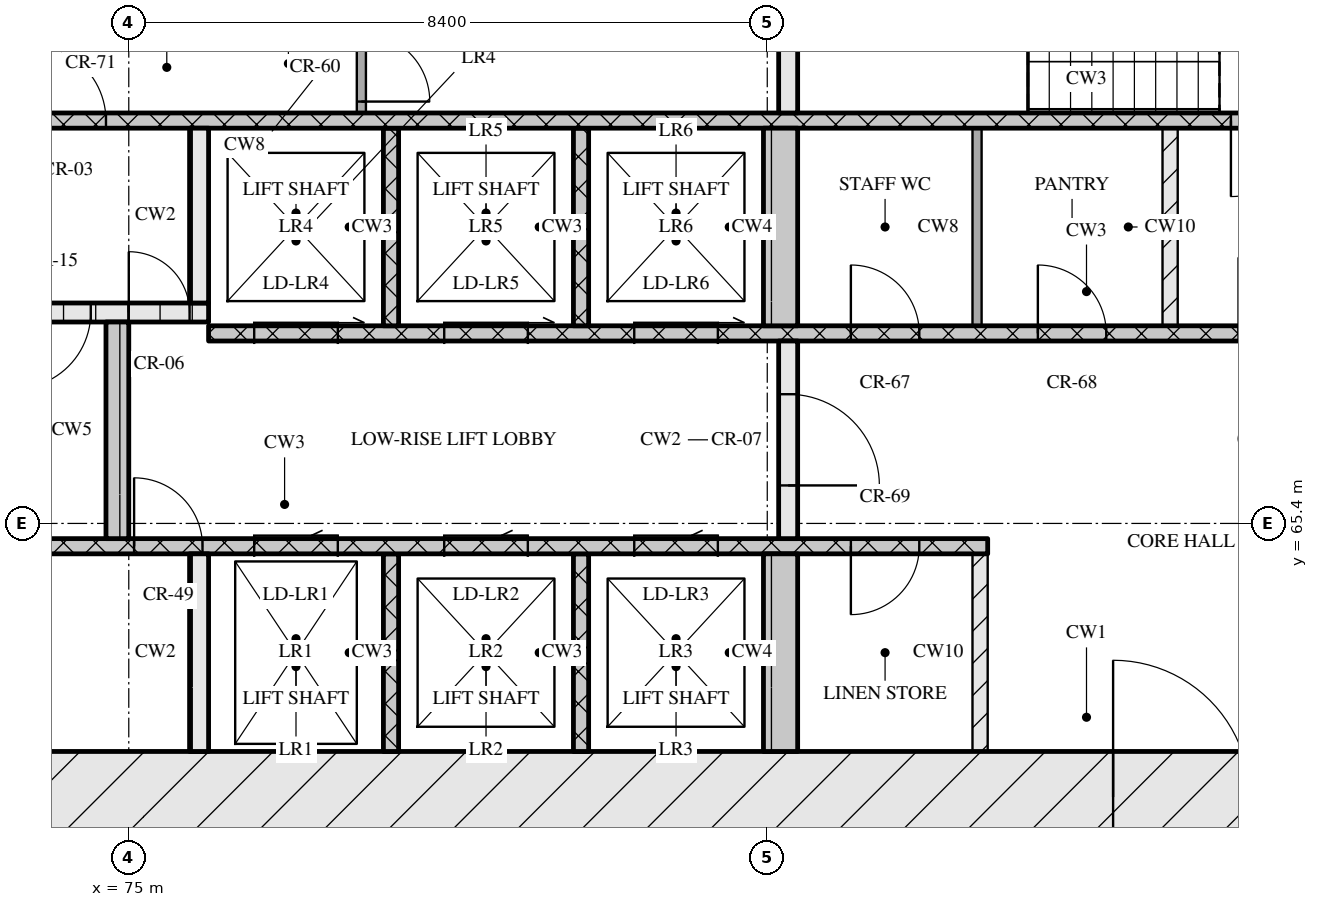
"""IFC4 building model, lengths in metres.
Left out: names, types, materials, properties, quantities, classifications, styles, units other than length and angle.
Written with IfcOpenShell. Run it as: python <this file> out.ifc"""

import sys

from ifc_helpers import new_model, si_unit, direction, frame, frame_2d, origin, place, context, subcontext, project, spatial, rectangle, extrude, element, fill, save


model = new_model("IFC4")
c1 = context("Model", 3, precision=1e-05, world=origin(), true_north=direction((0.0, 1.0)))
c2 = subcontext(c1, "Body", "Model", "MODEL_VIEW")
j1 = project(units=[si_unit("LENGTHUNIT", "METRE"), si_unit("PLANEANGLEUNIT", "RADIAN")], contexts=[c1])
p1 = place(None, origin())
s1 = spatial("IfcSite", under=j1, at=p1, CompositionType="ELEMENT")
p2 = place(p1, origin())
s2 = spatial("IfcBuilding", under=s1, at=p2, CompositionType="ELEMENT")
p3 = place(p2, frame((0.0, 0.0, 73.2)))
s3 = spatial("IfcBuildingStorey", under=s2, at=p3, CompositionType="ELEMENT", Elevation=73.2)
p4 = place(p3, frame((66.6, 61.8, 0.0), z_axis=(0.0, 0.0, 1.0), x_axis=(1.0, 0.0, 0.0)))
e1 = element("IfcWall", 1, at=p4, inside=s3, PredefinedType="SOLIDWALL", context=c2, shape_type="SweptSolid", body=[
    extrude(rectangle(XDim=42.0, YDim=1.2, at=frame_2d((21.0, 0.0))), origin(), (0.0, 0.0, 1.0), 3.32),
])
p5 = place(p4, frame((21.35, 0.0, 0.0)))
e2 = element("IfcOpeningElement", 2, at=p5, cuts=e1, PredefinedType="OPENING", context=c2, shape_type="SweptSolid", body=[
    extrude(rectangle(XDim=1.8, YDim=2.1, at=frame_2d((0.9, 1.05))), frame((0.0, 0.61, 0.0), z_axis=(0.0, -1.0, 0.0), x_axis=(1.0, 0.0, 0.0)), (0.0, 0.0, 1.0), 1.22),
])
p6 = place(p3, frame((75.925, 62.4, 0.0), z_axis=(0.0, 0.0, 1.0), x_axis=(0.0, 1.0, 0.0)))
e3 = element("IfcWall", 3, at=p6, inside=s3, PredefinedType="SOLIDWALL", context=c2, shape_type="SweptSolid", body=[
    extrude(rectangle(XDim=2.6, YDim=0.25, at=frame_2d((1.3, 0.0))), origin(), (0.0, 0.0, 1.0), 3.32),
])
for number, where, z_axis, x_axis in (
    (4, (78.45, 62.4, 0.0), (0.0, 0.0, 1.0), (0.0, 1.0, 0.0)),
    (5, (80.95, 62.4, 0.0), (0.0, 0.0, 1.0), (0.0, 1.0, 0.0)),
):
    element("IfcWall", number, at=place(p3, frame(where, z_axis=z_axis, x_axis=x_axis)), inside=s3, PredefinedType="SOLIDWALL", context=c2, shape_type="SweptSolid", body=[
        extrude(rectangle(XDim=2.6, YDim=0.2, at=frame_2d((1.3, 0.0))), origin(), (0.0, 0.0, 1.0), 3.32),
    ])
p7 = place(p3, frame((83.575, 62.4, 0.0), z_axis=(0.0, 0.0, 1.0), x_axis=(0.0, 1.0, 0.0)))
e6 = element("IfcWall", 6, at=p7, inside=s3, PredefinedType="SOLIDWALL", context=c2, shape_type="SweptSolid", body=[
    extrude(rectangle(XDim=2.6, YDim=0.45, at=frame_2d((1.3, 0.0))), origin(), (0.0, 0.0, 1.0), 3.32),
])
p8 = place(p3, frame((86.2, 62.4, 0.0), z_axis=(0.0, 0.0, 1.0), x_axis=(0.0, 1.0, 0.0)))
e7 = element("IfcWall", 7, at=p8, inside=s3, PredefinedType="PARTITIONING", context=c2, shape_type="SweptSolid", body=[
    extrude(rectangle(XDim=2.6, YDim=0.2, at=frame_2d((1.3, 0.0))), origin(), (0.0, 0.0, 1.0), 3.32),
])
p9 = place(p3, frame((67.8, 65.1, 0.0), z_axis=(0.0, 0.0, 1.0), x_axis=(1.0, 0.0, 0.0)))
e8 = element("IfcWall", 8, at=p9, inside=s3, PredefinedType="SOLIDWALL", context=c2, shape_type="SweptSolid", body=[
    extrude(rectangle(XDim=18.5, YDim=0.2, at=frame_2d((9.25, 0.0))), origin(), (0.0, 0.0, 1.0), 3.32),
])
p10 = place(p9, frame((7.27, 0.0, 0.0)))
e9 = element("IfcOpeningElement", 9, at=p10, cuts=e8, PredefinedType="OPENING", context=c2, shape_type="SweptSolid", body=[
    extrude(rectangle(XDim=0.9, YDim=2.1, at=frame_2d((0.45, 1.05))), frame((0.0, 0.11, 0.0), z_axis=(0.0, -1.0, 0.0), x_axis=(1.0, 0.0, 0.0)), (0.0, 0.0, 1.0), 0.22),
])
p11 = place(p9, frame((8.85, 0.0, 0.0)))
e10 = element("IfcOpeningElement", 10, at=p11, cuts=e8, PredefinedType="OPENING", context=c2, shape_type="SweptSolid", body=[
    extrude(rectangle(XDim=1.1, YDim=2.1, at=frame_2d((0.55, 1.05))), frame((0.0, 0.11, 0.0), z_axis=(0.0, -1.0, 0.0), x_axis=(1.0, 0.0, 0.0)), (0.0, 0.0, 1.0), 0.22),
])
p12 = place(p9, frame((11.35, 0.0, 0.0)))
e11 = element("IfcOpeningElement", 11, at=p12, cuts=e8, PredefinedType="OPENING", context=c2, shape_type="SweptSolid", body=[
    extrude(rectangle(XDim=1.1, YDim=2.1, at=frame_2d((0.55, 1.05))), frame((0.0, 0.11, 0.0), z_axis=(0.0, -1.0, 0.0), x_axis=(1.0, 0.0, 0.0)), (0.0, 0.0, 1.0), 0.22),
])
p13 = place(p9, frame((13.85, 0.0, 0.0)))
e12 = element("IfcOpeningElement", 12, at=p13, cuts=e8, PredefinedType="OPENING", context=c2, shape_type="SweptSolid", body=[
    extrude(rectangle(XDim=1.1, YDim=2.1, at=frame_2d((0.55, 1.05))), frame((0.0, 0.11, 0.0), z_axis=(0.0, -1.0, 0.0), x_axis=(1.0, 0.0, 0.0)), (0.0, 0.0, 1.0), 0.22),
])
p14 = place(p9, frame((16.7, 0.0, 0.0)))
e13 = element("IfcOpeningElement", 13, at=p14, cuts=e8, PredefinedType="OPENING", context=c2, shape_type="SweptSolid", body=[
    extrude(rectangle(XDim=0.9, YDim=2.1, at=frame_2d((0.45, 1.05))), frame((0.0, 0.11, 0.0), z_axis=(0.0, -1.0, 0.0), x_axis=(1.0, 0.0, 0.0)), (0.0, 0.0, 1.0), 0.22),
])
p15 = place(p3, frame((74.85, 65.2, 0.0), z_axis=(0.0, 0.0, 1.0), x_axis=(0.0, 1.0, 0.0)))
e14 = element("IfcWall", 14, at=p15, inside=s3, PredefinedType="SOLIDWALL", context=c2, shape_type="SweptSolid", body=[
    extrude(rectangle(XDim=2.85, YDim=0.3, at=frame_2d((1.425, 0.0))), origin(), (0.0, 0.0, 1.0), 3.32),
])
p16 = place(p3, frame((83.675, 65.2, 0.0), z_axis=(0.0, 0.0, 1.0), x_axis=(0.0, 1.0, 0.0)))
e15 = element("IfcWall", 15, at=p16, inside=s3, PredefinedType="SOLIDWALL", context=c2, shape_type="SweptSolid", body=[
    extrude(rectangle(XDim=2.6, YDim=0.25, at=frame_2d((1.3, 0.0))), origin(), (0.0, 0.0, 1.0), 3.32),
])
p17 = place(p16, frame((0.7, 0.0, 0.0)))
e16 = element("IfcOpeningElement", 16, at=p17, cuts=e15, PredefinedType="OPENING", context=c2, shape_type="SweptSolid", body=[
    extrude(rectangle(XDim=1.2, YDim=2.1, at=frame_2d((0.6, 1.05))), frame((0.0, 0.135, 0.0), z_axis=(0.0, -1.0, 0.0), x_axis=(1.0, 0.0, 0.0)), (0.0, 0.0, 1.0), 0.27),
])
p18 = place(p3, frame((76.05, 67.9, 0.0), z_axis=(0.0, 0.0, 1.0), x_axis=(1.0, 0.0, 0.0)))
e17 = element("IfcWall", 17, at=p18, inside=s3, PredefinedType="SOLIDWALL", context=c2, shape_type="SweptSolid", body=[
    extrude(rectangle(XDim=23.1, YDim=0.2, at=frame_2d((11.55, 0.0))), origin(), (0.0, 0.0, 1.0), 3.32),
])
p19 = place(p18, frame((0.6, 0.0, 0.0)))
e18 = element("IfcOpeningElement", 18, at=p19, cuts=e17, PredefinedType="OPENING", context=c2, shape_type="SweptSolid", body=[
    extrude(rectangle(XDim=1.1, YDim=2.1, at=frame_2d((0.55, 1.05))), frame((0.0, 0.11, 0.0), z_axis=(0.0, -1.0, 0.0), x_axis=(1.0, 0.0, 0.0)), (0.0, 0.0, 1.0), 0.22),
])
p20 = place(p18, frame((3.1, 0.0, 0.0)))
e19 = element("IfcOpeningElement", 19, at=p20, cuts=e17, PredefinedType="OPENING", context=c2, shape_type="SweptSolid", body=[
    extrude(rectangle(XDim=1.1, YDim=2.1, at=frame_2d((0.55, 1.05))), frame((0.0, 0.11, 0.0), z_axis=(0.0, -1.0, 0.0), x_axis=(1.0, 0.0, 0.0)), (0.0, 0.0, 1.0), 0.22),
])
p21 = place(p18, frame((5.6, 0.0, 0.0)))
e20 = element("IfcOpeningElement", 20, at=p21, cuts=e17, PredefinedType="OPENING", context=c2, shape_type="SweptSolid", body=[
    extrude(rectangle(XDim=1.1, YDim=2.1, at=frame_2d((0.55, 1.05))), frame((0.0, 0.11, 0.0), z_axis=(0.0, -1.0, 0.0), x_axis=(1.0, 0.0, 0.0)), (0.0, 0.0, 1.0), 0.22),
])
p22 = place(p18, frame((8.45, 0.0, 0.0)))
e21 = element("IfcOpeningElement", 21, at=p22, cuts=e17, PredefinedType="OPENING", context=c2, shape_type="SweptSolid", body=[
    extrude(rectangle(XDim=0.9, YDim=2.1, at=frame_2d((0.45, 1.05))), frame((0.0, 0.11, 0.0), z_axis=(0.0, -1.0, 0.0), x_axis=(1.0, 0.0, 0.0)), (0.0, 0.0, 1.0), 0.22),
])
p23 = place(p18, frame((10.91, 0.0, 0.0)))
e22 = element("IfcOpeningElement", 22, at=p23, cuts=e17, PredefinedType="OPENING", context=c2, shape_type="SweptSolid", body=[
    extrude(rectangle(XDim=0.9, YDim=2.1, at=frame_2d((0.45, 1.05))), frame((0.0, 0.11, 0.0), z_axis=(0.0, -1.0, 0.0), x_axis=(1.0, 0.0, 0.0)), (0.0, 0.0, 1.0), 0.22),
])
p24 = place(p18, frame((13.55, 0.0, 0.0)))
e23 = element("IfcOpeningElement", 23, at=p24, cuts=e17, PredefinedType="OPENING", context=c2, shape_type="SweptSolid", body=[
    extrude(rectangle(XDim=1.0, YDim=2.1, at=frame_2d((0.5, 1.05))), frame((0.0, 0.11, 0.0), z_axis=(0.0, -1.0, 0.0), x_axis=(1.0, 0.0, 0.0)), (0.0, 0.0, 1.0), 0.22),
])
for number, where, z_axis, x_axis in (
    (24, (78.45, 68.0, 0.0), (0.0, 0.0, 1.0), (0.0, 1.0, 0.0)),
    (25, (80.95, 68.0, 0.0), (0.0, 0.0, 1.0), (0.0, 1.0, 0.0)),
):
    element("IfcWall", number, at=place(p3, frame(where, z_axis=z_axis, x_axis=x_axis)), inside=s3, PredefinedType="SOLIDWALL", context=c2, shape_type="SweptSolid", body=[
        extrude(rectangle(XDim=2.6, YDim=0.2, at=frame_2d((1.3, 0.0))), origin(), (0.0, 0.0, 1.0), 3.32),
    ])
p25 = place(p3, frame((83.575, 68.0, 0.0), z_axis=(0.0, 0.0, 1.0), x_axis=(0.0, 1.0, 0.0)))
e26 = element("IfcWall", 26, at=p25, inside=s3, PredefinedType="SOLIDWALL", context=c2, shape_type="SweptSolid", body=[
    extrude(rectangle(XDim=2.6, YDim=0.45, at=frame_2d((1.3, 0.0))), origin(), (0.0, 0.0, 1.0), 3.32),
])
p26 = place(p3, frame((86.16, 68.0, 0.0), z_axis=(0.0, 0.0, 1.0), x_axis=(0.0, 1.0, 0.0)))
e27 = element("IfcWall", 27, at=p26, inside=s3, PredefinedType="PARTITIONING", context=c2, shape_type="SweptSolid", body=[
    extrude(rectangle(XDim=2.6, YDim=0.12, at=frame_2d((1.3, 0.0))), origin(), (0.0, 0.0, 1.0), 3.32),
])
p27 = place(p3, frame((88.7, 68.0, 0.0), z_axis=(0.0, 0.0, 1.0), x_axis=(0.0, 1.0, 0.0)))
e28 = element("IfcWall", 28, at=p27, inside=s3, PredefinedType="PARTITIONING", context=c2, shape_type="SweptSolid", body=[
    extrude(rectangle(XDim=2.6, YDim=0.2, at=frame_2d((1.3, 0.0))), origin(), (0.0, 0.0, 1.0), 3.32),
])
p28 = place(p3, frame((67.8, 68.175, 0.0), z_axis=(0.0, 0.0, 1.0), x_axis=(1.0, 0.0, 0.0)))
e29 = element("IfcWall", 29, at=p28, inside=s3, PredefinedType="SOLIDWALL", context=c2, shape_type="SweptSolid", body=[
    extrude(rectangle(XDim=8.25, YDim=0.25, at=frame_2d((4.125, 0.0))), origin(), (0.0, 0.0, 1.0), 3.32),
])
p29 = place(p28, frame((5.7, 0.0, 0.0)))
e30 = element("IfcOpeningElement", 30, at=p29, cuts=e29, PredefinedType="OPENING", context=c2, shape_type="SweptSolid", body=[
    extrude(rectangle(XDim=1.0, YDim=2.1, at=frame_2d((0.5, 1.05))), frame((0.0, 0.135, 0.0), z_axis=(0.0, -1.0, 0.0), x_axis=(1.0, 0.0, 0.0)), (0.0, 0.0, 1.0), 0.27),
])
p30 = place(p28, frame((7.2, 0.0, 0.0)))
e31 = element("IfcOpeningElement", 31, at=p30, cuts=e29, PredefinedType="OPENING", context=c2, shape_type="SweptSolid", body=[
    extrude(rectangle(XDim=0.8, YDim=2.1, at=frame_2d((0.4, 1.05))), frame((0.0, 0.135, 0.0), z_axis=(0.0, -1.0, 0.0), x_axis=(1.0, 0.0, 0.0)), (0.0, 0.0, 1.0), 0.27),
])
p31 = place(p3, frame((75.925, 68.3, 0.0), z_axis=(0.0, 0.0, 1.0), x_axis=(0.0, 1.0, 0.0)))
e32 = element("IfcWall", 32, at=p31, inside=s3, PredefinedType="SOLIDWALL", context=c2, shape_type="SweptSolid", body=[
    extrude(rectangle(XDim=2.3, YDim=0.25, at=frame_2d((1.15, 0.0))), origin(), (0.0, 0.0, 1.0), 3.32),
])
p32 = place(p3, frame((67.8, 70.7, 0.0), z_axis=(0.0, 0.0, 1.0), x_axis=(1.0, 0.0, 0.0)))
e33 = element("IfcWall", 33, at=p32, inside=s3, PredefinedType="SOLIDWALL", context=c2, shape_type="SweptSolid", body=[
    extrude(rectangle(XDim=39.6, YDim=0.2, at=frame_2d((19.8, 0.0))), origin(), (0.0, 0.0, 1.0), 3.32),
])
p33 = place(p32, frame((0.65, 0.0, 0.0)))
e34 = element("IfcOpeningElement", 34, at=p33, cuts=e33, PredefinedType="OPENING", context=c2, shape_type="SweptSolid", body=[
    extrude(rectangle(XDim=1.1, YDim=2.1, at=frame_2d((0.55, 1.05))), frame((0.0, 0.11, 0.0), z_axis=(0.0, -1.0, 0.0), x_axis=(1.0, 0.0, 0.0)), (0.0, 0.0, 1.0), 0.22),
])
p34 = place(p32, frame((3.25, 0.0, 0.0)))
e35 = element("IfcOpeningElement", 35, at=p34, cuts=e33, PredefinedType="OPENING", context=c2, shape_type="SweptSolid", body=[
    extrude(rectangle(XDim=1.1, YDim=2.1, at=frame_2d((0.55, 1.05))), frame((0.0, 0.11, 0.0), z_axis=(0.0, -1.0, 0.0), x_axis=(1.0, 0.0, 0.0)), (0.0, 0.0, 1.0), 0.22),
])
p35 = place(p32, frame((5.9, 0.0, 0.0)))
e36 = element("IfcOpeningElement", 36, at=p35, cuts=e33, PredefinedType="OPENING", context=c2, shape_type="SweptSolid", body=[
    extrude(rectangle(XDim=1.0, YDim=2.1, at=frame_2d((0.5, 1.05))), frame((0.0, 0.11, 0.0), z_axis=(0.0, -1.0, 0.0), x_axis=(1.0, 0.0, 0.0)), (0.0, 0.0, 1.0), 0.22),
])
p36 = place(p32, frame((21.7, 0.0, 0.0)))
e37 = element("IfcOpeningElement", 37, at=p36, cuts=e33, PredefinedType="OPENING", context=c2, shape_type="SweptSolid", body=[
    extrude(rectangle(XDim=1.0, YDim=2.1, at=frame_2d((0.5, 1.05))), frame((0.0, 0.11, 0.0), z_axis=(0.0, -1.0, 0.0), x_axis=(1.0, 0.0, 0.0)), (0.0, 0.0, 1.0), 0.22),
])
p37 = place(p32, frame((32.7, 0.0, 0.0)))
e38 = element("IfcOpeningElement", 38, at=p37, cuts=e33, PredefinedType="OPENING", context=c2, shape_type="SweptSolid", body=[
    extrude(rectangle(XDim=1.0, YDim=2.1, at=frame_2d((0.5, 1.05))), frame((0.0, 0.11, 0.0), z_axis=(0.0, -1.0, 0.0), x_axis=(1.0, 0.0, 0.0)), (0.0, 0.0, 1.0), 0.22),
])
p38 = place(p32, frame((35.25, 0.0, 0.0)))
e39 = element("IfcOpeningElement", 39, at=p38, cuts=e33, PredefinedType="OPENING", context=c2, shape_type="SweptSolid", body=[
    extrude(rectangle(XDim=1.1, YDim=2.1, at=frame_2d((0.55, 1.05))), frame((0.0, 0.11, 0.0), z_axis=(0.0, -1.0, 0.0), x_axis=(1.0, 0.0, 0.0)), (0.0, 0.0, 1.0), 0.22),
])
p39 = place(p32, frame((37.85, 0.0, 0.0)))
e40 = element("IfcOpeningElement", 40, at=p39, cuts=e33, PredefinedType="OPENING", context=c2, shape_type="SweptSolid", body=[
    extrude(rectangle(XDim=1.1, YDim=2.1, at=frame_2d((0.55, 1.05))), frame((0.0, 0.11, 0.0), z_axis=(0.0, -1.0, 0.0), x_axis=(1.0, 0.0, 0.0)), (0.0, 0.0, 1.0), 0.22),
])
p40 = place(p3, frame((78.06, 70.8, 0.0), z_axis=(0.0, 0.0, 1.0), x_axis=(0.0, 1.0, 0.0)))
e41 = element("IfcWall", 41, at=p40, inside=s3, PredefinedType="PARTITIONING", context=c2, shape_type="SweptSolid", body=[
    extrude(rectangle(XDim=1.2, YDim=0.12, at=frame_2d((0.6, 0.0))), origin(), (0.0, 0.0, 1.0), 3.32),
])
p41 = place(p40, frame((0.15, 0.0, 0.0)))
e42 = element("IfcOpeningElement", 42, at=p41, cuts=e41, PredefinedType="OPENING", context=c2, shape_type="SweptSolid", body=[
    extrude(rectangle(XDim=0.9, YDim=2.1, at=frame_2d((0.45, 1.05))), frame((0.0, 0.07, 0.0), z_axis=(0.0, -1.0, 0.0), x_axis=(1.0, 0.0, 0.0)), (0.0, 0.0, 1.0), 0.14),
])
p42 = place(p3, frame((83.675, 70.8, 0.0), z_axis=(0.0, 0.0, 1.0), x_axis=(0.0, 1.0, 0.0)))
e43 = element("IfcWall", 43, at=p42, inside=s3, PredefinedType="SOLIDWALL", context=c2, shape_type="SweptSolid", body=[
    extrude(rectangle(XDim=2.95, YDim=0.25, at=frame_2d((1.475, 0.0))), origin(), (0.0, 0.0, 1.0), 3.32),
])
p43 = place(p5, origin())
e44 = element("IfcDoor", 44, at=p43, inside=s3, OperationType="DOUBLE_DOOR_SINGLE_SWING", PredefinedType="DOOR", context=c2, shape_type="SweptSolid", body=[
    extrude(rectangle(XDim=1.8, YDim=2.1, at=frame_2d((0.9, 1.05))), frame((0.0, 0.025, 0.0), z_axis=(0.0, -1.0, 0.0), x_axis=(1.0, 0.0, 0.0)), (0.0, 0.0, 1.0), 0.05),
])
fill(e2, e44)
p44 = place(p10, origin())
e45 = element("IfcDoor", 45, at=p44, inside=s3, OperationType="SINGLE_SWING_LEFT", PredefinedType="DOOR", context=c2, shape_type="SweptSolid", body=[
    extrude(rectangle(XDim=0.9, YDim=2.1, at=frame_2d((0.45, 1.05))), frame((0.0, 0.025, 0.0), z_axis=(0.0, -1.0, 0.0), x_axis=(1.0, 0.0, 0.0)), (0.0, 0.0, 1.0), 0.05),
])
fill(e9, e45)
p45 = place(p11, origin())
e46 = element("IfcDoor", 46, at=p45, inside=s3, OperationType="SLIDING_TO_LEFT", PredefinedType="DOOR", context=c2, shape_type="SweptSolid", body=[
    extrude(rectangle(XDim=1.1, YDim=2.1, at=frame_2d((0.55, 1.05))), frame((0.0, 0.025, 0.0), z_axis=(0.0, -1.0, 0.0), x_axis=(1.0, 0.0, 0.0)), (0.0, 0.0, 1.0), 0.05),
])
fill(e10, e46)
p46 = place(p12, origin())
e47 = element("IfcDoor", 47, at=p46, inside=s3, OperationType="SLIDING_TO_LEFT", PredefinedType="DOOR", context=c2, shape_type="SweptSolid", body=[
    extrude(rectangle(XDim=1.1, YDim=2.1, at=frame_2d((0.55, 1.05))), frame((0.0, 0.025, 0.0), z_axis=(0.0, -1.0, 0.0), x_axis=(1.0, 0.0, 0.0)), (0.0, 0.0, 1.0), 0.05),
])
fill(e11, e47)
p47 = place(p13, origin())
e48 = element("IfcDoor", 48, at=p47, inside=s3, OperationType="SLIDING_TO_LEFT", PredefinedType="DOOR", context=c2, shape_type="SweptSolid", body=[
    extrude(rectangle(XDim=1.1, YDim=2.1, at=frame_2d((0.55, 1.05))), frame((0.0, 0.025, 0.0), z_axis=(0.0, -1.0, 0.0), x_axis=(1.0, 0.0, 0.0)), (0.0, 0.0, 1.0), 0.05),
])
fill(e12, e48)
p48 = place(p14, origin())
e49 = element("IfcDoor", 49, at=p48, inside=s3, OperationType="SINGLE_SWING_RIGHT", PredefinedType="DOOR", context=c2, shape_type="SweptSolid", body=[
    extrude(rectangle(XDim=0.9, YDim=2.1, at=frame_2d((0.45, 1.05))), frame((0.0, 0.025, 0.0), z_axis=(0.0, -1.0, 0.0), x_axis=(1.0, 0.0, 0.0)), (0.0, 0.0, 1.0), 0.05),
])
fill(e13, e49)
p49 = place(p17, origin())
e50 = element("IfcDoor", 50, at=p49, inside=s3, OperationType="SINGLE_SWING_RIGHT", PredefinedType="DOOR", context=c2, shape_type="SweptSolid", body=[
    extrude(rectangle(XDim=1.2, YDim=2.1, at=frame_2d((0.6, 1.05))), frame((0.0, 0.025, 0.0), z_axis=(0.0, -1.0, 0.0), x_axis=(1.0, 0.0, 0.0)), (0.0, 0.0, 1.0), 0.05),
])
fill(e16, e50)
p50 = place(p19, origin())
e51 = element("IfcDoor", 51, at=p50, inside=s3, OperationType="SLIDING_TO_RIGHT", PredefinedType="DOOR", context=c2, shape_type="SweptSolid", body=[
    extrude(rectangle(XDim=1.1, YDim=2.1, at=frame_2d((0.55, 1.05))), frame((0.0, 0.025, 0.0), z_axis=(0.0, -1.0, 0.0), x_axis=(1.0, 0.0, 0.0)), (0.0, 0.0, 1.0), 0.05),
])
fill(e18, e51)
p51 = place(p20, origin())
e52 = element("IfcDoor", 52, at=p51, inside=s3, OperationType="SLIDING_TO_RIGHT", PredefinedType="DOOR", context=c2, shape_type="SweptSolid", body=[
    extrude(rectangle(XDim=1.1, YDim=2.1, at=frame_2d((0.55, 1.05))), frame((0.0, 0.025, 0.0), z_axis=(0.0, -1.0, 0.0), x_axis=(1.0, 0.0, 0.0)), (0.0, 0.0, 1.0), 0.05),
])
fill(e19, e52)
p52 = place(p21, origin())
e53 = element("IfcDoor", 53, at=p52, inside=s3, OperationType="SLIDING_TO_RIGHT", PredefinedType="DOOR", context=c2, shape_type="SweptSolid", body=[
    extrude(rectangle(XDim=1.1, YDim=2.1, at=frame_2d((0.55, 1.05))), frame((0.0, 0.025, 0.0), z_axis=(0.0, -1.0, 0.0), x_axis=(1.0, 0.0, 0.0)), (0.0, 0.0, 1.0), 0.05),
])
fill(e20, e53)
p53 = place(p22, origin())
e54 = element("IfcDoor", 54, at=p53, inside=s3, OperationType="SINGLE_SWING_LEFT", PredefinedType="DOOR", context=c2, shape_type="SweptSolid", body=[
    extrude(rectangle(XDim=0.9, YDim=2.1, at=frame_2d((0.45, 1.05))), frame((0.0, 0.025, 0.0), z_axis=(0.0, -1.0, 0.0), x_axis=(1.0, 0.0, 0.0)), (0.0, 0.0, 1.0), 0.05),
])
fill(e21, e54)
p54 = place(p23, origin())
e55 = element("IfcDoor", 55, at=p54, inside=s3, OperationType="SINGLE_SWING_LEFT", PredefinedType="DOOR", context=c2, shape_type="SweptSolid", body=[
    extrude(rectangle(XDim=0.9, YDim=2.1, at=frame_2d((0.45, 1.05))), frame((0.0, 0.025, 0.0), z_axis=(0.0, -1.0, 0.0), x_axis=(1.0, 0.0, 0.0)), (0.0, 0.0, 1.0), 0.05),
])
fill(e22, e55)
p55 = place(p29, origin())
e56 = element("IfcDoor", 56, at=p55, inside=s3, OperationType="SINGLE_SWING_RIGHT", PredefinedType="DOOR", context=c2, shape_type="SweptSolid", body=[
    extrude(rectangle(XDim=1.0, YDim=2.1, at=frame_2d((0.5, 1.05))), frame((0.0, 0.025, 0.0), z_axis=(0.0, -1.0, 0.0), x_axis=(1.0, 0.0, 0.0)), (0.0, 0.0, 1.0), 0.05),
])
fill(e30, e56)
p56 = place(p30, origin())
e57 = element("IfcDoor", 57, at=p56, inside=s3, OperationType="SINGLE_SWING_LEFT", PredefinedType="DOOR", context=c2, shape_type="SweptSolid", body=[
    extrude(rectangle(XDim=0.8, YDim=2.1, at=frame_2d((0.4, 1.05))), frame((0.0, 0.025, 0.0), z_axis=(0.0, -1.0, 0.0), x_axis=(1.0, 0.0, 0.0)), (0.0, 0.0, 1.0), 0.05),
])
fill(e31, e57)
p57 = place(p35, origin())
e58 = element("IfcDoor", 58, at=p57, inside=s3, OperationType="SINGLE_SWING_LEFT", PredefinedType="DOOR", context=c2, shape_type="SweptSolid", body=[
    extrude(rectangle(XDim=1.0, YDim=2.1, at=frame_2d((0.5, 1.05))), frame((0.0, 0.025, 0.0), z_axis=(0.0, -1.0, 0.0), x_axis=(1.0, 0.0, 0.0)), (0.0, 0.0, 1.0), 0.05),
])
fill(e36, e58)
p58 = place(p36, origin())
e59 = element("IfcDoor", 59, at=p58, inside=s3, OperationType="SINGLE_SWING_RIGHT", PredefinedType="DOOR", context=c2, shape_type="SweptSolid", body=[
    extrude(rectangle(XDim=1.0, YDim=2.1, at=frame_2d((0.5, 1.05))), frame((0.0, 0.025, 0.0), z_axis=(0.0, -1.0, 0.0), x_axis=(1.0, 0.0, 0.0)), (0.0, 0.0, 1.0), 0.05),
])
fill(e37, e59)
p59 = place(p41, origin())
e60 = element("IfcDoor", 60, at=p59, inside=s3, OperationType="SINGLE_SWING_RIGHT", PredefinedType="DOOR", context=c2, shape_type="SweptSolid", body=[
    extrude(rectangle(XDim=0.9, YDim=2.1, at=frame_2d((0.45, 1.05))), frame((0.0, 0.025, 0.0), z_axis=(0.0, -1.0, 0.0), x_axis=(1.0, 0.0, 0.0)), (0.0, 0.0, 1.0), 0.05),
])
fill(e42, e60)
save(model, sys.argv[1])
